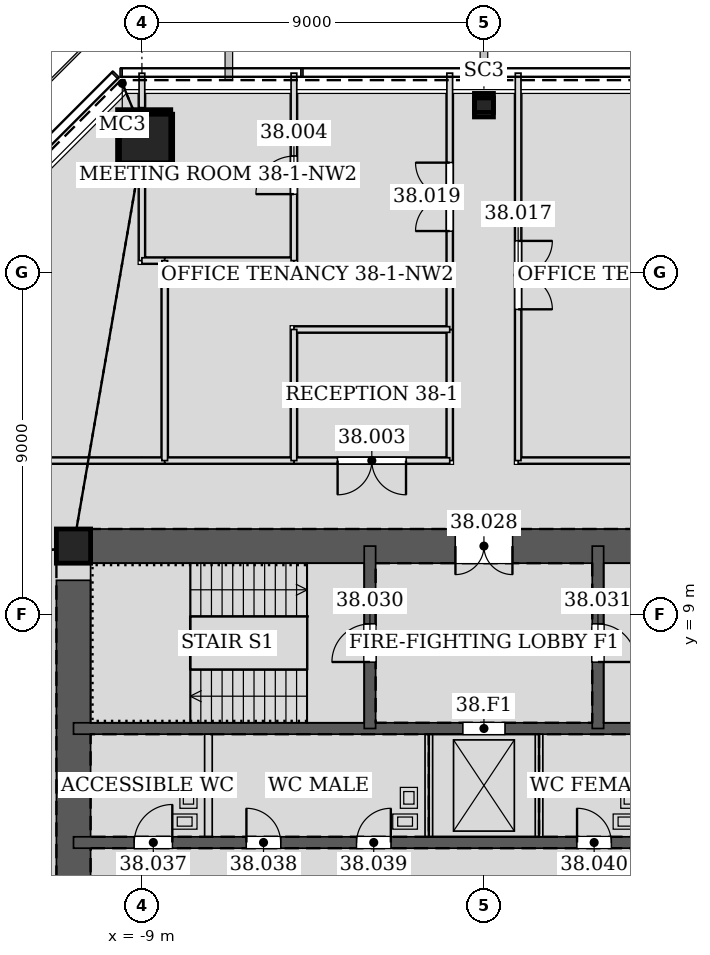
"""IFC4 building model, lengths in metres.
Left out: names, types, materials, properties, quantities, classifications, styles, units other than length and angle.
Written with IfcOpenShell. Run it as: python <this file> out.ifc"""

import sys

from ifc_helpers import new_model, si_unit, direction, frame, frame_2d, origin, origin_2d, place, context, subcontext, project, spatial, rectangle, hollow_rectangle, extrude, element, fill, save


model = new_model("IFC4")
c1 = context("Model", 3, precision=1e-05, world=origin(), true_north=direction((0.0, 1.0)))
c2 = subcontext(c1, "Body", "Model", "MODEL_VIEW")
j1 = project(units=[si_unit("LENGTHUNIT", "METRE"), si_unit("PLANEANGLEUNIT", "RADIAN")], contexts=[c1])
p1 = place(None, origin())
s1 = spatial("IfcSite", under=j1, at=p1, CompositionType="ELEMENT")
p2 = place(p1, origin())
s2 = spatial("IfcBuilding", under=s1, at=p2, CompositionType="ELEMENT")
p3 = place(p2, frame((0.0, 0.0, 168.0)))
s3 = spatial("IfcBuildingStorey", under=s2, at=p3, CompositionType="ELEMENT", Elevation=168.0)
p4 = place(p3, frame((-8.94, 21.584, 0.0), z_axis=(0.01173664659, -0.028237674468, 0.999532333078), x_axis=(0.923413851312, 0.38380575713, 0.0)))
e1 = element("IfcColumn", 1, at=p4, inside=s3, PredefinedType="COLUMN", context=c2, shape_type="SweptSolid", body=[
    extrude(hollow_rectangle(XDim=1.4, YDim=1.4, WallThickness=0.065, at=origin_2d()), origin(), (0.0, 0.0, 1.0), 4.202),
])
p5 = place(p3, frame((0.0, 22.462, 0.0), z_axis=(0.0, -0.028239619523, 0.999601182417), x_axis=(1.0, 0.0, 0.0)))
e2 = element("IfcColumn", 2, at=p5, inside=s3, PredefinedType="COLUMN", context=c2, shape_type="SweptSolid", body=[
    extrude(hollow_rectangle(XDim=0.5, YDim=0.5, WallThickness=0.025, at=origin_2d()), origin(), (0.0, 0.0, 1.0), 4.202),
])
p6 = place(p3, frame((-10.8, 10.8, 0.0), z_axis=(0.0, 0.0, 1.0), x_axis=(1.0, 0.0, 0.0)))
e3 = element("IfcColumn", 3, at=p6, inside=s3, PredefinedType="COLUMN", context=c2, shape_type="SweptSolid", body=[
    extrude(hollow_rectangle(XDim=0.9, YDim=0.9, WallThickness=0.06, at=origin_2d()), origin(), (0.0, 0.0, 1.0), 4.2),
])
p7 = place(p3, frame((10.8, 10.8, 0.0), z_axis=(0.0, 0.0, 1.0), x_axis=(-1.0, 0.0, 0.0)))
e4 = element("IfcWall", 4, at=p7, inside=s3, PredefinedType="SOLIDWALL", context=c2, shape_type="SweptSolid", body=[
    extrude(rectangle(XDim=21.6, YDim=0.9, at=frame_2d((10.8, 0.0))), origin(), (0.0, 0.0, 1.0), 4.2),
])
p8 = place(p7, frame((10.05, 0.0, 0.0)))
e5 = element("IfcOpeningElement", 5, at=p8, cuts=e4, PredefinedType="OPENING", context=c2, shape_type="SweptSolid", body=[
    extrude(rectangle(XDim=1.5, YDim=2.1, at=frame_2d((0.75, 1.05))), frame((0.0, 0.46, 0.0), z_axis=(0.0, -1.0, 0.0), x_axis=(1.0, 0.0, 0.0)), (0.0, 0.0, 1.0), 0.92),
])
p9 = place(p3, frame((-10.8, 10.8, 0.0), z_axis=(0.0, 0.0, 1.0), x_axis=(0.0, -1.0, 0.0)))
e6 = element("IfcWall", 6, at=p9, inside=s3, PredefinedType="SOLIDWALL", context=c2, shape_type="SweptSolid", body=[
    extrude(rectangle(XDim=21.6, YDim=0.9, at=frame_2d((10.8, 0.0))), origin(), (0.0, 0.0, 1.0), 4.2),
])
p10 = place(p9, frame((8.7, 0.0, 0.0)))
e7 = element("IfcOpeningElement", 7, at=p10, cuts=e6, PredefinedType="OPENING", context=c2, shape_type="SweptSolid", body=[
    extrude(rectangle(XDim=1.2, YDim=2.1, at=frame_2d((0.6, 1.05))), frame((0.0, 0.46, 0.0), z_axis=(0.0, -1.0, 0.0), x_axis=(1.0, 0.0, 0.0)), (0.0, 0.0, 1.0), 0.92),
])
p11 = place(p9, frame((11.7, 0.0, 0.0)))
e8 = element("IfcOpeningElement", 8, at=p11, cuts=e6, PredefinedType="OPENING", context=c2, shape_type="SweptSolid", body=[
    extrude(rectangle(XDim=1.2, YDim=2.1, at=frame_2d((0.6, 1.05))), frame((0.0, 0.46, 0.0), z_axis=(0.0, -1.0, 0.0), x_axis=(1.0, 0.0, 0.0)), (0.0, 0.0, 1.0), 0.92),
])
p12 = place(p3, frame((-10.8, 3.0, 0.0), z_axis=(0.0, 0.0, 1.0), x_axis=(1.0, 0.0, 0.0)))
e9 = element("IfcWall", 9, at=p12, inside=s3, PredefinedType="SOLIDWALL", context=c2, shape_type="SweptSolid", body=[
    extrude(rectangle(XDim=21.6, YDim=0.3, at=frame_2d((10.8, 0.0))), origin(), (0.0, 0.0, 1.0), 4.2),
])
p13 = place(p12, frame((1.6, 0.0, 0.0)))
e10 = element("IfcOpeningElement", 10, at=p13, cuts=e9, PredefinedType="OPENING", context=c2, shape_type="SweptSolid", body=[
    extrude(rectangle(XDim=1.0, YDim=2.1, at=frame_2d((0.5, 1.05))), frame((0.0, 0.16, 0.0), z_axis=(0.0, -1.0, 0.0), x_axis=(1.0, 0.0, 0.0)), (0.0, 0.0, 1.0), 0.32),
])
p14 = place(p12, frame((4.55, 0.0, 0.0)))
e11 = element("IfcOpeningElement", 11, at=p14, cuts=e9, PredefinedType="OPENING", context=c2, shape_type="SweptSolid", body=[
    extrude(rectangle(XDim=0.9, YDim=2.1, at=frame_2d((0.45, 1.05))), frame((0.0, 0.16, 0.0), z_axis=(0.0, -1.0, 0.0), x_axis=(1.0, 0.0, 0.0)), (0.0, 0.0, 1.0), 0.32),
])
p15 = place(p12, frame((7.45, 0.0, 0.0)))
e12 = element("IfcOpeningElement", 12, at=p15, cuts=e9, PredefinedType="OPENING", context=c2, shape_type="SweptSolid", body=[
    extrude(rectangle(XDim=0.9, YDim=2.1, at=frame_2d((0.45, 1.05))), frame((0.0, 0.16, 0.0), z_axis=(0.0, -1.0, 0.0), x_axis=(1.0, 0.0, 0.0)), (0.0, 0.0, 1.0), 0.32),
])
p16 = place(p12, frame((13.25, 0.0, 0.0)))
e13 = element("IfcOpeningElement", 13, at=p16, cuts=e9, PredefinedType="OPENING", context=c2, shape_type="SweptSolid", body=[
    extrude(rectangle(XDim=0.9, YDim=2.1, at=frame_2d((0.45, 1.05))), frame((0.0, 0.16, 0.0), z_axis=(0.0, -1.0, 0.0), x_axis=(1.0, 0.0, 0.0)), (0.0, 0.0, 1.0), 0.32),
])
p17 = place(p3, frame((-10.8, 6.0, 0.0), z_axis=(0.0, 0.0, 1.0), x_axis=(1.0, 0.0, 0.0)))
e14 = element("IfcWall", 14, at=p17, inside=s3, PredefinedType="SOLIDWALL", context=c2, shape_type="SweptSolid", body=[
    extrude(rectangle(XDim=21.6, YDim=0.3, at=frame_2d((10.8, 0.0))), origin(), (0.0, 0.0, 1.0), 4.2),
])
p18 = place(p17, frame((10.25, 0.0, 0.0)))
e15 = element("IfcOpeningElement", 15, at=p18, cuts=e14, PredefinedType="OPENING", context=c2, shape_type="SweptSolid", body=[
    extrude(rectangle(XDim=1.1, YDim=2.1, at=frame_2d((0.55, 1.05))), frame((0.0, 0.16, 0.0), z_axis=(0.0, -1.0, 0.0), x_axis=(1.0, 0.0, 0.0)), (0.0, 0.0, 1.0), 0.32),
])
p19 = place(p3, frame((-3.0, 6.0, 0.0), z_axis=(0.0, 0.0, 1.0), x_axis=(0.0, 1.0, 0.0)))
e16 = element("IfcWall", 16, at=p19, inside=s3, PredefinedType="SOLIDWALL", context=c2, shape_type="SweptSolid", body=[
    extrude(rectangle(XDim=4.8, YDim=0.3, at=frame_2d((2.4, 0.0))), origin(), (0.0, 0.0, 1.0), 4.2),
])
p20 = place(p19, frame((1.75, 0.0, 0.0)))
e17 = element("IfcOpeningElement", 17, at=p20, cuts=e16, PredefinedType="OPENING", context=c2, shape_type="SweptSolid", body=[
    extrude(rectangle(XDim=1.0, YDim=2.1, at=frame_2d((0.5, 1.05))), frame((0.0, 0.16, 0.0), z_axis=(0.0, -1.0, 0.0), x_axis=(1.0, 0.0, 0.0)), (0.0, 0.0, 1.0), 0.32),
])
p21 = place(p3, frame((3.0, 6.0, 0.0), z_axis=(0.0, 0.0, 1.0), x_axis=(0.0, 1.0, 0.0)))
e18 = element("IfcWall", 18, at=p21, inside=s3, PredefinedType="SOLIDWALL", context=c2, shape_type="SweptSolid", body=[
    extrude(rectangle(XDim=4.8, YDim=0.3, at=frame_2d((2.4, 0.0))), origin(), (0.0, 0.0, 1.0), 4.2),
])
p22 = place(p21, frame((1.75, 0.0, 0.0)))
e19 = element("IfcOpeningElement", 19, at=p22, cuts=e18, PredefinedType="OPENING", context=c2, shape_type="SweptSolid", body=[
    extrude(rectangle(XDim=1.0, YDim=2.1, at=frame_2d((0.5, 1.05))), frame((0.0, 0.16, 0.0), z_axis=(0.0, -1.0, 0.0), x_axis=(1.0, 0.0, 0.0)), (0.0, 0.0, 1.0), 0.32),
])
p23 = place(p3, frame((-0.9, 16.501, 0.0), z_axis=(0.0, 0.0, 1.0), x_axis=(0.0, -1.0, 0.0)))
e20 = element("IfcWall", 20, at=p23, inside=s3, PredefinedType="PARTITIONING", context=c2, shape_type="SweptSolid", body=[
    extrude(rectangle(XDim=3.451, YDim=0.15, at=frame_2d((1.726, 0.0))), origin(), (0.0, 0.0, 1.0), 3.492),
])
p24 = place(p3, frame((-0.9, 13.05, 0.0), z_axis=(0.0, 0.0, 1.0), x_axis=(-1.0, 0.0, 0.0)))
e21 = element("IfcWall", 21, at=p24, inside=s3, PredefinedType="PARTITIONING", context=c2, shape_type="SweptSolid", body=[
    extrude(rectangle(XDim=4.101, YDim=0.15, at=frame_2d((2.051, 0.0))), origin(), (0.0, 0.0, 1.0), 4.035),
])
p25 = place(p24, frame((1.15, 0.0, 0.0)))
e22 = element("IfcOpeningElement", 22, at=p25, cuts=e21, PredefinedType="OPENING", context=c2, shape_type="SweptSolid", body=[
    extrude(rectangle(XDim=1.8, YDim=2.4, at=frame_2d((0.9, 1.2))), frame((0.0, 0.085, 0.0), z_axis=(0.0, -1.0, 0.0), x_axis=(1.0, 0.0, 0.0)), (0.0, 0.0, 1.0), 0.17),
])
p26 = place(p3, frame((5.001, 13.05, 0.0), z_axis=(0.0, 0.0, 1.0), x_axis=(-1.0, 0.0, 0.0)))
e23 = element("IfcWall", 23, at=p26, inside=s3, PredefinedType="PARTITIONING", context=c2, shape_type="SweptSolid", body=[
    extrude(rectangle(XDim=4.101, YDim=0.15, at=frame_2d((2.051, 0.0))), origin(), (0.0, 0.0, 1.0), 4.035),
])
p27 = place(p3, frame((0.9, 13.05, 0.0), z_axis=(0.0, 0.0, 1.0), x_axis=(0.0, 1.0, 0.0)))
e24 = element("IfcWall", 24, at=p27, inside=s3, PredefinedType="PARTITIONING", context=c2, shape_type="SweptSolid", body=[
    extrude(rectangle(XDim=10.196, YDim=0.15, at=frame_2d((5.098, 0.0))), origin(), (0.0, 0.0, 1.0), 3.492),
])
p28 = place(p27, frame((3.981, 0.0, 0.0)))
e25 = element("IfcOpeningElement", 25, at=p28, cuts=e24, PredefinedType="OPENING", context=c2, shape_type="SweptSolid", body=[
    extrude(rectangle(XDim=1.8, YDim=2.4, at=frame_2d((0.9, 1.2))), frame((0.0, 0.085, 0.0), z_axis=(0.0, -1.0, 0.0), x_axis=(1.0, 0.0, 0.0)), (0.0, 0.0, 1.0), 0.17),
])
p29 = place(p3, frame((-8.399, 13.05, 0.0), z_axis=(0.0, 0.0, 1.0), x_axis=(-1.0, 0.0, 0.0)))
e26 = element("IfcWall", 26, at=p29, inside=s3, PredefinedType="PARTITIONING", context=c2, shape_type="SweptSolid", body=[
    extrude(rectangle(XDim=4.651, YDim=0.15, at=frame_2d((2.326, 0.0))), origin(), (0.0, 0.0, 1.0), 3.098),
])
p30 = place(p3, frame((-4.999, 13.05, 0.0), z_axis=(0.0, 0.0, 1.0), x_axis=(-1.0, 0.0, 0.0)))
e27 = element("IfcWall", 27, at=p30, inside=s3, PredefinedType="PARTITIONING", context=c2, shape_type="SweptSolid", body=[
    extrude(rectangle(XDim=3.402, YDim=0.15, at=frame_2d((1.701, 0.0))), origin(), (0.0, 0.0, 1.0), 4.035),
])
p31 = place(p3, frame((-0.9, 23.246, 0.0), z_axis=(0.0, 0.0, 1.0), x_axis=(0.0, -1.0, 0.0)))
e28 = element("IfcWall", 28, at=p31, inside=s3, PredefinedType="PARTITIONING", context=c2, shape_type="SweptSolid", body=[
    extrude(rectangle(XDim=6.747, YDim=0.15, at=frame_2d((3.374, 0.0))), origin(), (0.0, 0.0, 1.0), 3.492),
])
p32 = place(p31, frame((2.356, 0.0, 0.0)))
e29 = element("IfcOpeningElement", 29, at=p32, cuts=e28, PredefinedType="OPENING", context=c2, shape_type="SweptSolid", body=[
    extrude(rectangle(XDim=1.8, YDim=2.4, at=frame_2d((0.9, 1.2))), frame((0.0, 0.085, 0.0), z_axis=(0.0, -1.0, 0.0), x_axis=(1.0, 0.0, 0.0)), (0.0, 0.0, 1.0), 0.17),
])
p33 = place(p3, frame((-0.9, 16.5, 0.0), z_axis=(0.0, 0.0, 1.0), x_axis=(-1.0, 0.0, 0.0)))
e30 = element("IfcWall", 30, at=p33, inside=s3, PredefinedType="PARTITIONING", context=c2, shape_type="SweptSolid", body=[
    extrude(rectangle(XDim=4.1, YDim=0.15, at=frame_2d((2.05, 0.0))), origin(), (0.0, 0.0, 1.0), 3.499),
])
p34 = place(p3, frame((-5.0, 16.5, 0.0), z_axis=(0.0, 0.0, 1.0), x_axis=(0.0, -1.0, 0.0)))
e31 = element("IfcWall", 31, at=p34, inside=s3, PredefinedType="PARTITIONING", context=c2, shape_type="SweptSolid", body=[
    extrude(rectangle(XDim=3.45, YDim=0.15, at=frame_2d((1.725, 0.0))), origin(), (0.0, 0.0, 1.0), 3.492),
])
p35 = place(p3, frame((-9.0, 23.244, 0.0), z_axis=(0.0, 0.0, 1.0), x_axis=(0.0, -1.0, 0.0)))
e32 = element("IfcWall", 32, at=p35, inside=s3, PredefinedType="PARTITIONING", context=c2, shape_type="SweptSolid", body=[
    extrude(rectangle(XDim=0.906, YDim=0.15, at=frame_2d((0.453, 0.0))), origin(), (0.0, 0.0, 1.0), 4.035),
])
p36 = place(p3, frame((-9.0, 20.642, 0.0), z_axis=(0.0, 0.0, 1.0), x_axis=(0.0, -1.0, 0.0)))
e33 = element("IfcWall", 33, at=p36, inside=s3, PredefinedType="PARTITIONING", context=c2, shape_type="SweptSolid", body=[
    extrude(rectangle(XDim=2.329, YDim=0.15, at=frame_2d((1.165, 0.0))), origin(), (0.0, 0.0, 1.0), 3.098),
])
p37 = place(p3, frame((-9.0, 18.312, 0.0), z_axis=(0.0, 0.0, 1.0), x_axis=(1.0, 0.0, 0.0)))
e34 = element("IfcWall", 34, at=p37, inside=s3, PredefinedType="PARTITIONING", context=c2, shape_type="SweptSolid", body=[
    extrude(rectangle(XDim=0.601, YDim=0.15, at=frame_2d((0.301, 0.0))), origin(), (0.0, 0.0, 1.0), 4.035),
])
p38 = place(p3, frame((-8.401, 18.312, 0.0), z_axis=(0.0, 0.0, 1.0), x_axis=(1.0, 0.0, 0.0)))
e35 = element("IfcWall", 35, at=p38, inside=s3, PredefinedType="PARTITIONING", context=c2, shape_type="SweptSolid", body=[
    extrude(rectangle(XDim=3.401, YDim=0.15, at=frame_2d((1.7, 0.0))), origin(), (0.0, 0.0, 1.0), 4.035),
])
p39 = place(p3, frame((-5.0, 18.312, 0.0), z_axis=(0.0, 0.0, 1.0), x_axis=(0.0, 1.0, 0.0)))
e36 = element("IfcWall", 36, at=p39, inside=s3, PredefinedType="PARTITIONING", context=c2, shape_type="SweptSolid", body=[
    extrude(rectangle(XDim=4.934, YDim=0.15, at=frame_2d((2.467, 0.0))), origin(), (0.0, 0.0, 1.0), 3.492),
])
p40 = place(p39, frame((1.75, 0.0, 0.0)))
e37 = element("IfcOpeningElement", 37, at=p40, cuts=e36, PredefinedType="OPENING", context=c2, shape_type="SweptSolid", body=[
    extrude(rectangle(XDim=1.0, YDim=2.1, at=frame_2d((0.5, 1.05))), frame((0.0, 0.085, 0.0), z_axis=(0.0, -1.0, 0.0), x_axis=(1.0, 0.0, 0.0)), (0.0, 0.0, 1.0), 0.17),
])
p41 = place(p3, frame((-8.4, 13.05, 0.0), z_axis=(0.0, 0.0, 1.0), x_axis=(0.0, 1.0, 0.0)))
e38 = element("IfcWall", 38, at=p41, inside=s3, PredefinedType="PARTITIONING", context=c2, shape_type="SweptSolid", body=[
    extrude(rectangle(XDim=5.262, YDim=0.15, at=frame_2d((2.631, 0.0))), origin(), (0.0, 0.0, 1.0), 3.492),
])
for number, where, z_axis, x_axis in (
    (39, (-7.25, 3.15, 0.0), (0.0, 0.0, 1.0), (0.0, 1.0, 0.0)),
    (40, (-1.45, 3.15, 0.0), (0.0, 0.0, 1.0), (0.0, 1.0, 0.0)),
    (41, (1.45, 3.15, 0.0), (0.0, 0.0, 1.0), (0.0, 1.0, 0.0)),
):
    element("IfcWall", number, at=place(p3, frame(where, z_axis=z_axis, x_axis=x_axis)), inside=s3, PredefinedType="PARTITIONING", context=c2, shape_type="SweptSolid", body=[
        extrude(rectangle(XDim=2.7, YDim=0.2, at=frame_2d((1.35, 0.0))), origin(), (0.0, 0.0, 1.0), 4.035),
    ])
p42 = place(p25, origin())
e42 = element("IfcDoor", 42, at=p42, inside=s3, OperationType="DOUBLE_DOOR_SINGLE_SWING", PredefinedType="DOOR", context=c2, shape_type="SweptSolid", body=[
    extrude(rectangle(XDim=1.8, YDim=2.4, at=frame_2d((0.9, 1.2))), frame((0.0, 0.025, 0.0), z_axis=(0.0, -1.0, 0.0), x_axis=(1.0, 0.0, 0.0)), (0.0, 0.0, 1.0), 0.05),
])
fill(e22, e42)
p43 = place(p40, origin())
e43 = element("IfcDoor", 43, at=p43, inside=s3, OperationType="SINGLE_SWING_LEFT", PredefinedType="DOOR", context=c2, shape_type="SweptSolid", body=[
    extrude(rectangle(XDim=1.0, YDim=2.1, at=frame_2d((0.5, 1.05))), frame((0.0, 0.025, 0.0), z_axis=(0.0, -1.0, 0.0), x_axis=(1.0, 0.0, 0.0)), (0.0, 0.0, 1.0), 0.05),
])
fill(e37, e43)
p44 = place(p28, frame((1.8, 0.0, 0.0), z_axis=(0.0, 0.0, 1.0), x_axis=(-1.0, 0.0, 0.0)))
e44 = element("IfcDoor", 44, at=p44, inside=s3, OperationType="DOUBLE_DOOR_SINGLE_SWING", PredefinedType="DOOR", context=c2, shape_type="SweptSolid", body=[
    extrude(rectangle(XDim=1.8, YDim=2.4, at=frame_2d((0.9, 1.2))), frame((0.0, 0.025, 0.0), z_axis=(0.0, -1.0, 0.0), x_axis=(1.0, 0.0, 0.0)), (0.0, 0.0, 1.0), 0.05),
])
fill(e25, e44)
p45 = place(p32, frame((1.8, 0.0, 0.0), z_axis=(0.0, 0.0, 1.0), x_axis=(-1.0, 0.0, 0.0)))
e45 = element("IfcDoor", 45, at=p45, inside=s3, OperationType="DOUBLE_DOOR_SINGLE_SWING", PredefinedType="DOOR", context=c2, shape_type="SweptSolid", body=[
    extrude(rectangle(XDim=1.8, YDim=2.4, at=frame_2d((0.9, 1.2))), frame((0.0, 0.025, 0.0), z_axis=(0.0, -1.0, 0.0), x_axis=(1.0, 0.0, 0.0)), (0.0, 0.0, 1.0), 0.05),
])
fill(e29, e45)
p46 = place(p8, origin())
e46 = element("IfcDoor", 46, at=p46, inside=s3, OperationType="DOUBLE_DOOR_SINGLE_SWING", PredefinedType="DOOR", context=c2, shape_type="SweptSolid", body=[
    extrude(rectangle(XDim=1.5, YDim=2.1, at=frame_2d((0.75, 1.05))), frame((0.0, 0.025, 0.0), z_axis=(0.0, -1.0, 0.0), x_axis=(1.0, 0.0, 0.0)), (0.0, 0.0, 1.0), 0.05),
])
fill(e5, e46)
p47 = place(p20, origin())
e47 = element("IfcDoor", 47, at=p47, inside=s3, OperationType="SINGLE_SWING_LEFT", PredefinedType="DOOR", context=c2, shape_type="SweptSolid", body=[
    extrude(rectangle(XDim=1.0, YDim=2.1, at=frame_2d((0.5, 1.05))), frame((0.0, 0.025, 0.0), z_axis=(0.0, -1.0, 0.0), x_axis=(1.0, 0.0, 0.0)), (0.0, 0.0, 1.0), 0.05),
])
fill(e17, e47)
p48 = place(p22, frame((1.0, 0.0, 0.0), z_axis=(0.0, 0.0, 1.0), x_axis=(-1.0, 0.0, 0.0)))
e48 = element("IfcDoor", 48, at=p48, inside=s3, OperationType="SINGLE_SWING_RIGHT", PredefinedType="DOOR", context=c2, shape_type="SweptSolid", body=[
    extrude(rectangle(XDim=1.0, YDim=2.1, at=frame_2d((0.5, 1.05))), frame((0.0, 0.025, 0.0), z_axis=(0.0, -1.0, 0.0), x_axis=(1.0, 0.0, 0.0)), (0.0, 0.0, 1.0), 0.05),
])
fill(e19, e48)
p49 = place(p13, origin())
e49 = element("IfcDoor", 49, at=p49, inside=s3, OperationType="SINGLE_SWING_RIGHT", PredefinedType="DOOR", context=c2, shape_type="SweptSolid", body=[
    extrude(rectangle(XDim=1.0, YDim=2.1, at=frame_2d((0.5, 1.05))), frame((0.0, 0.025, 0.0), z_axis=(0.0, -1.0, 0.0), x_axis=(1.0, 0.0, 0.0)), (0.0, 0.0, 1.0), 0.05),
])
fill(e10, e49)
p50 = place(p14, origin())
e50 = element("IfcDoor", 50, at=p50, inside=s3, OperationType="SINGLE_SWING_LEFT", PredefinedType="DOOR", context=c2, shape_type="SweptSolid", body=[
    extrude(rectangle(XDim=0.9, YDim=2.1, at=frame_2d((0.45, 1.05))), frame((0.0, 0.025, 0.0), z_axis=(0.0, -1.0, 0.0), x_axis=(1.0, 0.0, 0.0)), (0.0, 0.0, 1.0), 0.05),
])
fill(e11, e50)
p51 = place(p15, origin())
e51 = element("IfcDoor", 51, at=p51, inside=s3, OperationType="SINGLE_SWING_RIGHT", PredefinedType="DOOR", context=c2, shape_type="SweptSolid", body=[
    extrude(rectangle(XDim=0.9, YDim=2.1, at=frame_2d((0.45, 1.05))), frame((0.0, 0.025, 0.0), z_axis=(0.0, -1.0, 0.0), x_axis=(1.0, 0.0, 0.0)), (0.0, 0.0, 1.0), 0.05),
])
fill(e12, e51)
p52 = place(p16, origin())
e52 = element("IfcDoor", 52, at=p52, inside=s3, OperationType="SINGLE_SWING_LEFT", PredefinedType="DOOR", context=c2, shape_type="SweptSolid", body=[
    extrude(rectangle(XDim=0.9, YDim=2.1, at=frame_2d((0.45, 1.05))), frame((0.0, 0.025, 0.0), z_axis=(0.0, -1.0, 0.0), x_axis=(1.0, 0.0, 0.0)), (0.0, 0.0, 1.0), 0.05),
])
fill(e13, e52)
p53 = place(p18, origin())
e53 = element("IfcDoor", 53, at=p53, inside=s3, OperationType="DOUBLE_DOOR_SLIDING", PredefinedType="DOOR", context=c2, shape_type="SweptSolid", body=[
    extrude(rectangle(XDim=1.1, YDim=2.1, at=frame_2d((0.55, 1.05))), frame((0.0, 0.025, 0.0), z_axis=(0.0, -1.0, 0.0), x_axis=(1.0, 0.0, 0.0)), (0.0, 0.0, 1.0), 0.05),
])
fill(e15, e53)
save(model, sys.argv[1])
